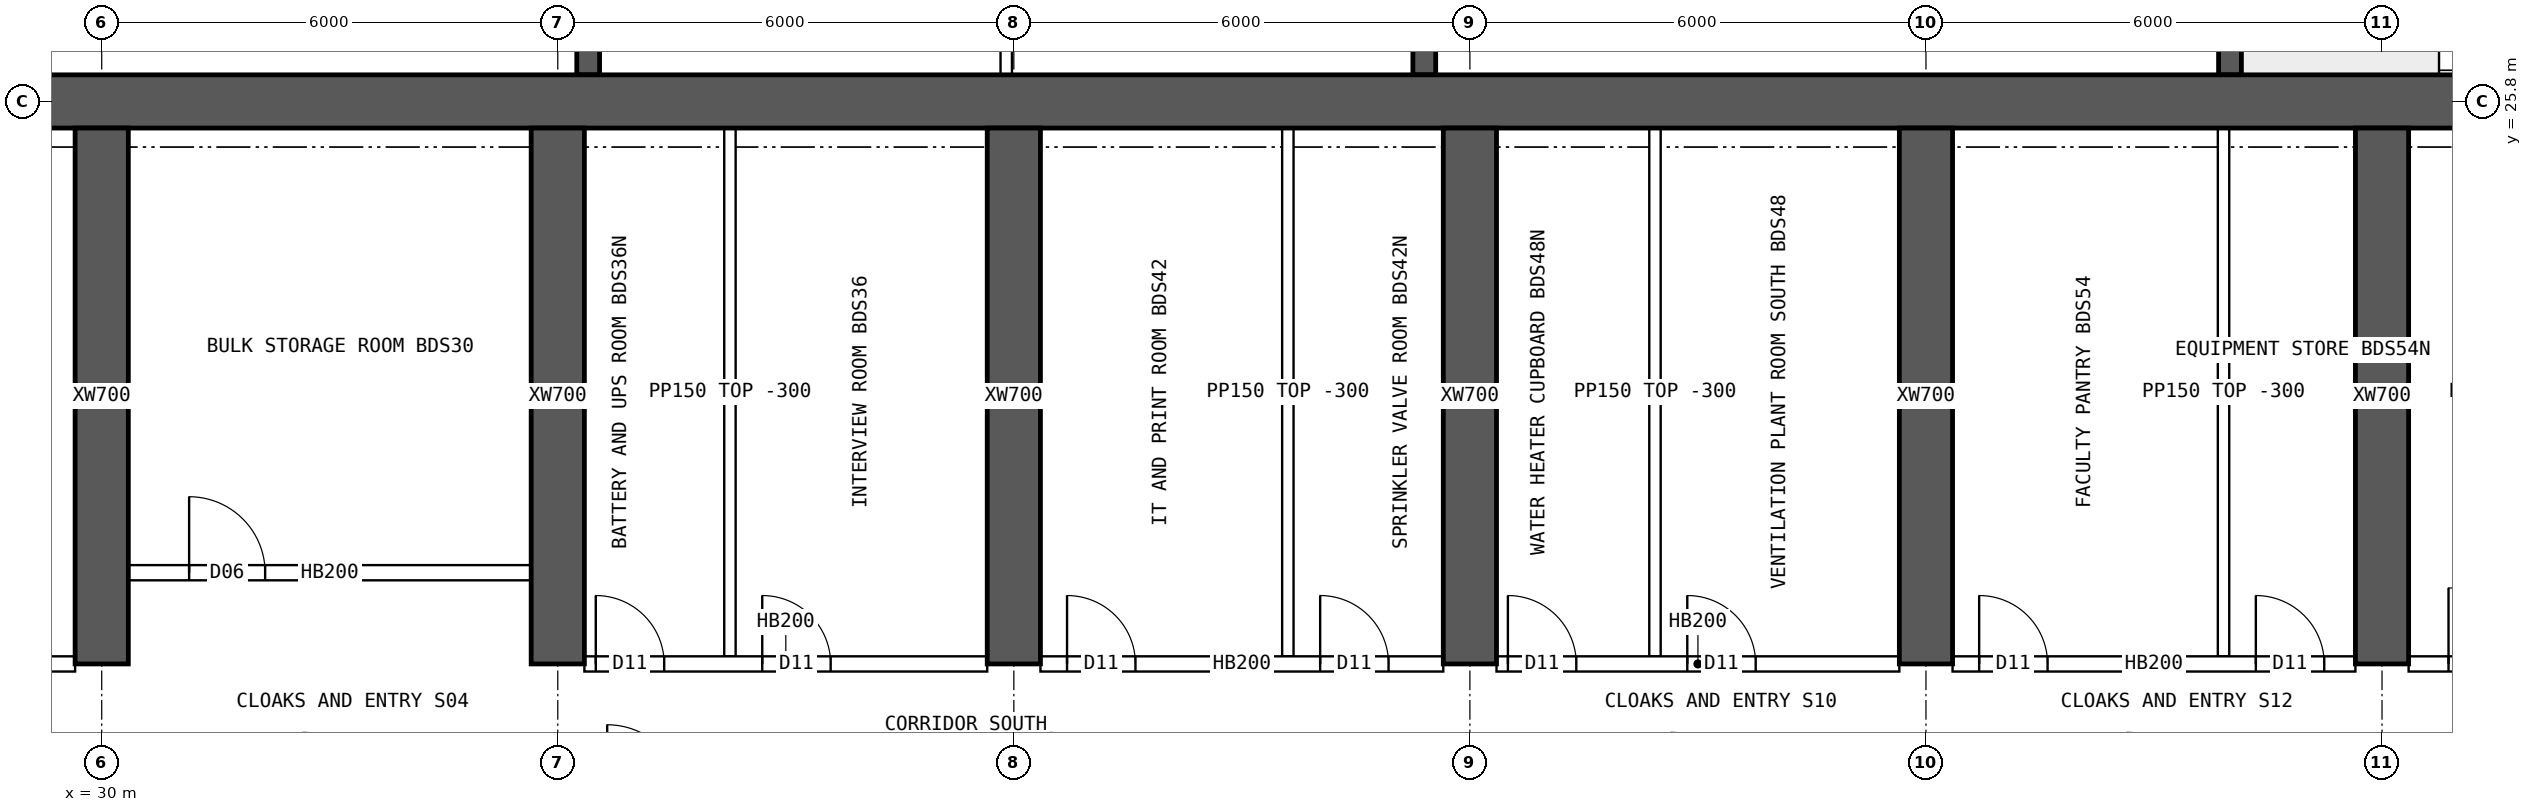
"""IFC4 building model, lengths in metres.
Left out: names, types, materials, properties, quantities, classifications, styles, units other than length and angle.
Written with IfcOpenShell. Run it as: python <this file> out.ifc"""

import sys

from ifc_helpers import new_model, si_unit, direction, frame, frame_2d, origin, place, context, subcontext, project, spatial, rectangle, extrude, element, fill, save


model = new_model("IFC4")
c1 = context("Model", 3, precision=1e-05, world=origin(), true_north=direction((0.0, 1.0)))
c2 = subcontext(c1, "Body", "Model", "MODEL_VIEW")
j1 = project(units=[si_unit("LENGTHUNIT", "METRE"), si_unit("PLANEANGLEUNIT", "RADIAN")], contexts=[c1])
p1 = place(None, origin())
s1 = spatial("IfcSite", under=j1, at=p1, CompositionType="ELEMENT")
p2 = place(p1, origin())
s2 = spatial("IfcBuilding", under=s1, at=p2, CompositionType="ELEMENT")
p3 = place(p2, frame((0.0, 0.0, 254.05)))
s3 = spatial("IfcBuildingStorey", under=s2, at=p3, CompositionType="ELEMENT", Elevation=254.05)
p4 = place(p3, frame((18.0, 25.8, 0.0), z_axis=(0.0, 0.0, 1.0), x_axis=(1.0, 0.0, 0.0)))
e1 = element("IfcWall", 1, at=p4, inside=s3, PredefinedType="SHEAR", context=c2, shape_type="SweptSolid", body=[
    extrude(rectangle(XDim=48.0, YDim=0.7, at=frame_2d((24.0, 0.0))), origin(), (0.0, 0.0, 1.0), 3.75),
])
for number, where, z_axis, x_axis in (
    (2, (58.0, 26.15, 0.0), (0.0, 0.0, 1.0), (0.0, 1.0, 0.0)),
    (3, (36.4, 26.15, 0.0), (0.0, 0.0, 1.0), (0.0, 1.0, 0.0)),
    (4, (47.4, 26.15, 0.0), (0.0, 0.0, 1.0), (0.0, 1.0, 0.0)),
):
    element("IfcWall", number, at=place(p3, frame(where, z_axis=z_axis, x_axis=x_axis)), inside=s3, PredefinedType="SHEAR", context=c2, shape_type="SweptSolid", body=[
        extrude(rectangle(XDim=4.1, YDim=0.3, at=frame_2d((2.05, 0.0))), origin(), (0.0, 0.0, 1.0), 3.75),
    ])
for number, where, z_axis, x_axis in (
    (5, (30.0, 18.4, 0.0), (0.0, 0.0, 1.0), (0.0, 1.0, 0.0)),
    (6, (36.0, 18.4, 0.0), (0.0, 0.0, 1.0), (0.0, 1.0, 0.0)),
    (7, (42.0, 18.4, 0.0), (0.0, 0.0, 1.0), (0.0, 1.0, 0.0)),
    (8, (48.0, 18.4, 0.0), (0.0, 0.0, 1.0), (0.0, 1.0, 0.0)),
    (9, (54.0, 18.4, 0.0), (0.0, 0.0, 1.0), (0.0, 1.0, 0.0)),
    (10, (60.0, 18.4, 0.0), (0.0, 0.0, 1.0), (0.0, 1.0, 0.0)),
):
    element("IfcWall", number, at=place(p3, frame(where, z_axis=z_axis, x_axis=x_axis)), inside=s3, PredefinedType="SHEAR", context=c2, shape_type="SweptSolid", body=[
        extrude(rectangle(XDim=7.05, YDim=0.7, at=frame_2d((3.525, 0.0))), origin(), (0.0, 0.0, 1.0), 3.75),
    ])
p5 = place(p3, frame((41.9, 26.15, 0.0), z_axis=(0.0, 0.0, 1.0), x_axis=(0.0, 1.0, 0.0)))
e11 = element("IfcWall", 11, at=p5, inside=s3, PredefinedType="SOLIDWALL", context=c2, shape_type="SweptSolid", body=[
    extrude(rectangle(XDim=4.1, YDim=0.15, at=frame_2d((2.05, 0.0))), origin(), (0.0, 0.0, 1.0), 3.45),
])
p6 = place(p3, frame((24.35, 18.4, 0.0), z_axis=(0.0, 0.0, 1.0), x_axis=(1.0, 0.0, 0.0)))
e12 = element("IfcWall", 12, at=p6, inside=s3, PredefinedType="SOLIDWALL", context=c2, shape_type="SweptSolid", body=[
    extrude(rectangle(XDim=5.3, YDim=0.2, at=frame_2d((2.65, 0.0))), origin(), (0.0, 0.0, 1.0), 3.45),
])
p7 = place(p6, frame((0.15, 0.0, 0.0)))
e13 = element("IfcOpeningElement", 13, at=p7, cuts=e12, PredefinedType="OPENING", context=c2, shape_type="SweptSolid", body=[
    extrude(rectangle(XDim=0.9, YDim=2.1, at=frame_2d((0.45, 1.05))), frame((0.0, 0.11, 0.0), z_axis=(0.0, -1.0, 0.0), x_axis=(1.0, 0.0, 0.0)), (0.0, 0.0, 1.0), 0.22),
])
p8 = place(p6, frame((2.26, 0.0, 0.0)))
e14 = element("IfcOpeningElement", 14, at=p8, cuts=e12, PredefinedType="OPENING", context=c2, shape_type="SweptSolid", body=[
    extrude(rectangle(XDim=0.9, YDim=2.1, at=frame_2d((0.45, 1.05))), frame((0.0, 0.11, 0.0), z_axis=(0.0, -1.0, 0.0), x_axis=(1.0, 0.0, 0.0)), (0.0, 0.0, 1.0), 0.22),
])
p9 = place(p3, frame((36.35, 18.4, 0.0), z_axis=(0.0, 0.0, 1.0), x_axis=(1.0, 0.0, 0.0)))
e15 = element("IfcWall", 15, at=p9, inside=s3, PredefinedType="SOLIDWALL", context=c2, shape_type="SweptSolid", body=[
    extrude(rectangle(XDim=5.3, YDim=0.2, at=frame_2d((2.65, 0.0))), origin(), (0.0, 0.0, 1.0), 3.45),
])
p10 = place(p9, frame((0.15, 0.0, 0.0)))
e16 = element("IfcOpeningElement", 16, at=p10, cuts=e15, PredefinedType="OPENING", context=c2, shape_type="SweptSolid", body=[
    extrude(rectangle(XDim=0.9, YDim=2.1, at=frame_2d((0.45, 1.05))), frame((0.0, 0.11, 0.0), z_axis=(0.0, -1.0, 0.0), x_axis=(1.0, 0.0, 0.0)), (0.0, 0.0, 1.0), 0.22),
])
p11 = place(p9, frame((2.34, 0.0, 0.0)))
e17 = element("IfcOpeningElement", 17, at=p11, cuts=e15, PredefinedType="OPENING", context=c2, shape_type="SweptSolid", body=[
    extrude(rectangle(XDim=0.9, YDim=2.1, at=frame_2d((0.45, 1.05))), frame((0.0, 0.11, 0.0), z_axis=(0.0, -1.0, 0.0), x_axis=(1.0, 0.0, 0.0)), (0.0, 0.0, 1.0), 0.22),
])
p12 = place(p3, frame((42.35, 18.4, 0.0), z_axis=(0.0, 0.0, 1.0), x_axis=(1.0, 0.0, 0.0)))
e18 = element("IfcWall", 18, at=p12, inside=s3, PredefinedType="SOLIDWALL", context=c2, shape_type="SweptSolid", body=[
    extrude(rectangle(XDim=5.3, YDim=0.2, at=frame_2d((2.65, 0.0))), origin(), (0.0, 0.0, 1.0), 3.45),
])
p13 = place(p12, frame((0.35, 0.0, 0.0)))
e19 = element("IfcOpeningElement", 19, at=p13, cuts=e18, PredefinedType="OPENING", context=c2, shape_type="SweptSolid", body=[
    extrude(rectangle(XDim=0.9, YDim=2.1, at=frame_2d((0.45, 1.05))), frame((0.0, 0.11, 0.0), z_axis=(0.0, -1.0, 0.0), x_axis=(1.0, 0.0, 0.0)), (0.0, 0.0, 1.0), 0.22),
])
p14 = place(p12, frame((3.68, 0.0, 0.0)))
e20 = element("IfcOpeningElement", 20, at=p14, cuts=e18, PredefinedType="OPENING", context=c2, shape_type="SweptSolid", body=[
    extrude(rectangle(XDim=0.9, YDim=2.1, at=frame_2d((0.45, 1.05))), frame((0.0, 0.11, 0.0), z_axis=(0.0, -1.0, 0.0), x_axis=(1.0, 0.0, 0.0)), (0.0, 0.0, 1.0), 0.22),
])
p15 = place(p3, frame((48.35, 18.4, 0.0), z_axis=(0.0, 0.0, 1.0), x_axis=(1.0, 0.0, 0.0)))
e21 = element("IfcWall", 21, at=p15, inside=s3, PredefinedType="SOLIDWALL", context=c2, shape_type="SweptSolid", body=[
    extrude(rectangle(XDim=5.3, YDim=0.2, at=frame_2d((2.65, 0.0))), origin(), (0.0, 0.0, 1.0), 3.45),
])
p16 = place(p15, frame((0.15, 0.0, 0.0)))
e22 = element("IfcOpeningElement", 22, at=p16, cuts=e21, PredefinedType="OPENING", context=c2, shape_type="SweptSolid", body=[
    extrude(rectangle(XDim=0.9, YDim=2.1, at=frame_2d((0.45, 1.05))), frame((0.0, 0.11, 0.0), z_axis=(0.0, -1.0, 0.0), x_axis=(1.0, 0.0, 0.0)), (0.0, 0.0, 1.0), 0.22),
])
p17 = place(p15, frame((2.51, 0.0, 0.0)))
e23 = element("IfcOpeningElement", 23, at=p17, cuts=e21, PredefinedType="OPENING", context=c2, shape_type="SweptSolid", body=[
    extrude(rectangle(XDim=0.9, YDim=2.1, at=frame_2d((0.45, 1.05))), frame((0.0, 0.11, 0.0), z_axis=(0.0, -1.0, 0.0), x_axis=(1.0, 0.0, 0.0)), (0.0, 0.0, 1.0), 0.22),
])
p18 = place(p3, frame((54.35, 18.4, 0.0), z_axis=(0.0, 0.0, 1.0), x_axis=(1.0, 0.0, 0.0)))
e24 = element("IfcWall", 24, at=p18, inside=s3, PredefinedType="SOLIDWALL", context=c2, shape_type="SweptSolid", body=[
    extrude(rectangle(XDim=5.3, YDim=0.2, at=frame_2d((2.65, 0.0))), origin(), (0.0, 0.0, 1.0), 3.45),
])
p19 = place(p18, frame((0.35, 0.0, 0.0)))
e25 = element("IfcOpeningElement", 25, at=p19, cuts=e24, PredefinedType="OPENING", context=c2, shape_type="SweptSolid", body=[
    extrude(rectangle(XDim=0.9, YDim=2.1, at=frame_2d((0.45, 1.05))), frame((0.0, 0.11, 0.0), z_axis=(0.0, -1.0, 0.0), x_axis=(1.0, 0.0, 0.0)), (0.0, 0.0, 1.0), 0.22),
])
p20 = place(p18, frame((3.99, 0.0, 0.0)))
e26 = element("IfcOpeningElement", 26, at=p20, cuts=e24, PredefinedType="OPENING", context=c2, shape_type="SweptSolid", body=[
    extrude(rectangle(XDim=0.9, YDim=2.1, at=frame_2d((0.45, 1.05))), frame((0.0, 0.11, 0.0), z_axis=(0.0, -1.0, 0.0), x_axis=(1.0, 0.0, 0.0)), (0.0, 0.0, 1.0), 0.22),
])
p21 = place(p3, frame((60.35, 18.4, 0.0), z_axis=(0.0, 0.0, 1.0), x_axis=(1.0, 0.0, 0.0)))
e27 = element("IfcWall", 27, at=p21, inside=s3, PredefinedType="SOLIDWALL", context=c2, shape_type="SweptSolid", body=[
    extrude(rectangle(XDim=5.3, YDim=0.2, at=frame_2d((2.65, 0.0))), origin(), (0.0, 0.0, 1.0), 3.45),
])
p22 = place(p21, frame((0.525, 0.0, 0.0)))
e28 = element("IfcOpeningElement", 28, at=p22, cuts=e27, PredefinedType="OPENING", context=c2, shape_type="SweptSolid", body=[
    extrude(rectangle(XDim=1.0, YDim=2.1, at=frame_2d((0.5, 1.05))), frame((0.0, 0.11, 0.0), z_axis=(0.0, -1.0, 0.0), x_axis=(1.0, 0.0, 0.0)), (0.0, 0.0, 1.0), 0.22),
])
p23 = place(p3, frame((30.35, 19.6, 0.0), z_axis=(0.0, 0.0, 1.0), x_axis=(1.0, 0.0, 0.0)))
e29 = element("IfcWall", 29, at=p23, inside=s3, PredefinedType="SOLIDWALL", context=c2, shape_type="SweptSolid", body=[
    extrude(rectangle(XDim=5.3, YDim=0.2, at=frame_2d((2.65, 0.0))), origin(), (0.0, 0.0, 1.0), 3.45),
])
p24 = place(p23, frame((0.8, 0.0, 0.0)))
e30 = element("IfcOpeningElement", 30, at=p24, cuts=e29, PredefinedType="OPENING", context=c2, shape_type="SweptSolid", body=[
    extrude(rectangle(XDim=1.0, YDim=2.1, at=frame_2d((0.5, 1.05))), frame((0.0, 0.11, 0.0), z_axis=(0.0, -1.0, 0.0), x_axis=(1.0, 0.0, 0.0)), (0.0, 0.0, 1.0), 0.22),
])
for number, where, z_axis, x_axis in (
    (31, (38.265, 18.5, 0.0), (0.0, 0.0, 1.0), (0.0, 1.0, 0.0)),
    (32, (45.605, 18.5, 0.0), (0.0, 0.0, 1.0), (0.0, 1.0, 0.0)),
    (33, (50.435, 18.5, 0.0), (0.0, 0.0, 1.0), (0.0, 1.0, 0.0)),
    (34, (57.915, 18.5, 0.0), (0.0, 0.0, 1.0), (0.0, 1.0, 0.0)),
):
    element("IfcWall", number, at=place(p3, frame(where, z_axis=z_axis, x_axis=x_axis)), inside=s3, PredefinedType="PARTITIONING", context=c2, shape_type="SweptSolid", body=[
        extrude(rectangle(XDim=6.95, YDim=0.15, at=frame_2d((3.475, 0.0))), origin(), (0.0, 0.0, 1.0), 3.45),
    ])
p25 = place(p24, origin())
e35 = element("IfcDoor", 35, at=p25, inside=s3, OperationType="SINGLE_SWING_LEFT", PredefinedType="DOOR", context=c2, shape_type="SweptSolid", body=[
    extrude(rectangle(XDim=1.0, YDim=2.1, at=frame_2d((0.5, 1.05))), frame((0.0, 0.025, 0.0), z_axis=(0.0, -1.0, 0.0), x_axis=(1.0, 0.0, 0.0)), (0.0, 0.0, 1.0), 0.05),
])
fill(e30, e35)
p26 = place(p10, origin())
e36 = element("IfcDoor", 36, at=p26, inside=s3, OperationType="SINGLE_SWING_LEFT", PredefinedType="DOOR", context=c2, shape_type="SweptSolid", body=[
    extrude(rectangle(XDim=0.9, YDim=2.1, at=frame_2d((0.45, 1.05))), frame((0.0, 0.025, 0.0), z_axis=(0.0, -1.0, 0.0), x_axis=(1.0, 0.0, 0.0)), (0.0, 0.0, 1.0), 0.05),
])
fill(e16, e36)
p27 = place(p11, origin())
e37 = element("IfcDoor", 37, at=p27, inside=s3, OperationType="SINGLE_SWING_LEFT", PredefinedType="DOOR", context=c2, shape_type="SweptSolid", body=[
    extrude(rectangle(XDim=0.9, YDim=2.1, at=frame_2d((0.45, 1.05))), frame((0.0, 0.025, 0.0), z_axis=(0.0, -1.0, 0.0), x_axis=(1.0, 0.0, 0.0)), (0.0, 0.0, 1.0), 0.05),
])
fill(e17, e37)
p28 = place(p13, origin())
e38 = element("IfcDoor", 38, at=p28, inside=s3, OperationType="SINGLE_SWING_LEFT", PredefinedType="DOOR", context=c2, shape_type="SweptSolid", body=[
    extrude(rectangle(XDim=0.9, YDim=2.1, at=frame_2d((0.45, 1.05))), frame((0.0, 0.025, 0.0), z_axis=(0.0, -1.0, 0.0), x_axis=(1.0, 0.0, 0.0)), (0.0, 0.0, 1.0), 0.05),
])
fill(e19, e38)
p29 = place(p14, origin())
e39 = element("IfcDoor", 39, at=p29, inside=s3, OperationType="SINGLE_SWING_LEFT", PredefinedType="DOOR", context=c2, shape_type="SweptSolid", body=[
    extrude(rectangle(XDim=0.9, YDim=2.1, at=frame_2d((0.45, 1.05))), frame((0.0, 0.025, 0.0), z_axis=(0.0, -1.0, 0.0), x_axis=(1.0, 0.0, 0.0)), (0.0, 0.0, 1.0), 0.05),
])
fill(e20, e39)
p30 = place(p16, origin())
e40 = element("IfcDoor", 40, at=p30, inside=s3, OperationType="SINGLE_SWING_LEFT", PredefinedType="DOOR", context=c2, shape_type="SweptSolid", body=[
    extrude(rectangle(XDim=0.9, YDim=2.1, at=frame_2d((0.45, 1.05))), frame((0.0, 0.025, 0.0), z_axis=(0.0, -1.0, 0.0), x_axis=(1.0, 0.0, 0.0)), (0.0, 0.0, 1.0), 0.05),
])
fill(e22, e40)
p31 = place(p17, origin())
e41 = element("IfcDoor", 41, at=p31, inside=s3, OperationType="SINGLE_SWING_LEFT", PredefinedType="DOOR", context=c2, shape_type="SweptSolid", body=[
    extrude(rectangle(XDim=0.9, YDim=2.1, at=frame_2d((0.45, 1.05))), frame((0.0, 0.025, 0.0), z_axis=(0.0, -1.0, 0.0), x_axis=(1.0, 0.0, 0.0)), (0.0, 0.0, 1.0), 0.05),
])
fill(e23, e41)
p32 = place(p19, origin())
e42 = element("IfcDoor", 42, at=p32, inside=s3, OperationType="SINGLE_SWING_LEFT", PredefinedType="DOOR", context=c2, shape_type="SweptSolid", body=[
    extrude(rectangle(XDim=0.9, YDim=2.1, at=frame_2d((0.45, 1.05))), frame((0.0, 0.025, 0.0), z_axis=(0.0, -1.0, 0.0), x_axis=(1.0, 0.0, 0.0)), (0.0, 0.0, 1.0), 0.05),
])
fill(e25, e42)
p33 = place(p20, origin())
e43 = element("IfcDoor", 43, at=p33, inside=s3, OperationType="SINGLE_SWING_LEFT", PredefinedType="DOOR", context=c2, shape_type="SweptSolid", body=[
    extrude(rectangle(XDim=0.9, YDim=2.1, at=frame_2d((0.45, 1.05))), frame((0.0, 0.025, 0.0), z_axis=(0.0, -1.0, 0.0), x_axis=(1.0, 0.0, 0.0)), (0.0, 0.0, 1.0), 0.05),
])
fill(e26, e43)
p34 = place(p22, origin())
e44 = element("IfcDoor", 44, at=p34, inside=s3, OperationType="SINGLE_SWING_LEFT", PredefinedType="DOOR", context=c2, shape_type="SweptSolid", body=[
    extrude(rectangle(XDim=1.0, YDim=2.1, at=frame_2d((0.5, 1.05))), frame((0.0, 0.025, 0.0), z_axis=(0.0, -1.0, 0.0), x_axis=(1.0, 0.0, 0.0)), (0.0, 0.0, 1.0), 0.05),
])
fill(e28, e44)
save(model, sys.argv[1])
